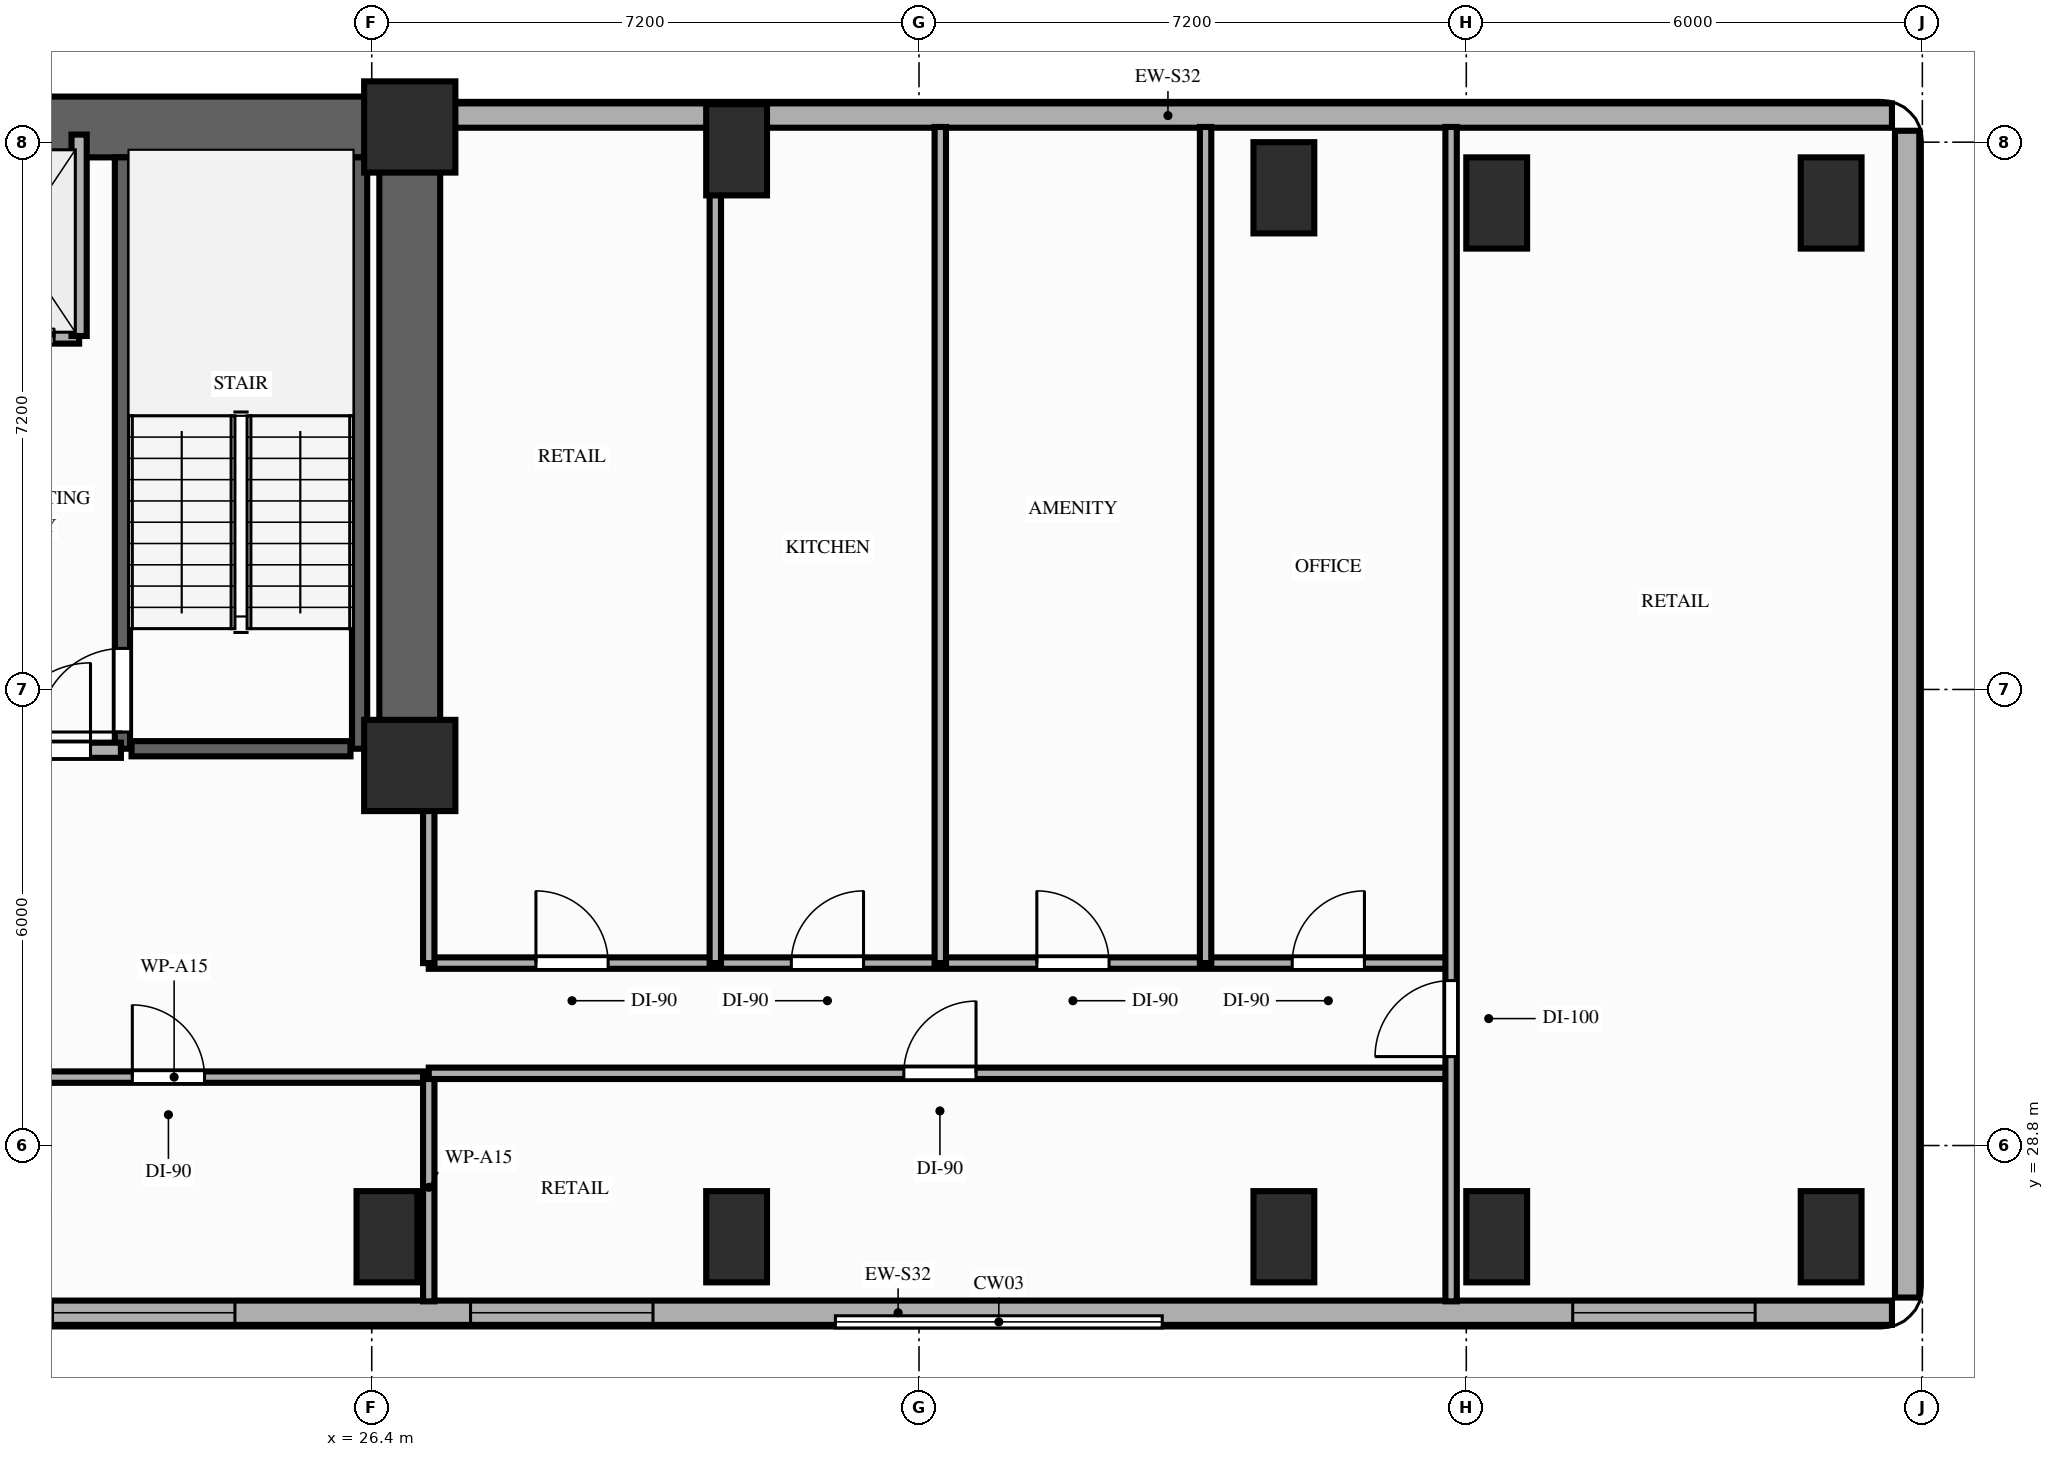
"""IFC4 building model, lengths in metres.
Left out: names, types, materials, properties, quantities, classifications, styles, units other than length and angle.
Written with IfcOpenShell. Run it as: python <this file> out.ifc"""

import sys

from ifc_helpers import new_model, si_unit, direction, frame, frame_2d, origin, origin_2d, place, context, subcontext, project, spatial, rectangle, extrude, element, fill, save


model = new_model("IFC4")
c1 = context("Model", 3, precision=1e-05, world=origin(), true_north=direction((0.0, 1.0)))
c2 = subcontext(c1, "Body", "Model", "MODEL_VIEW")
j1 = project(units=[si_unit("LENGTHUNIT", "METRE"), si_unit("PLANEANGLEUNIT", "RADIAN")], contexts=[c1])
p1 = place(None, origin())
s1 = spatial("IfcSite", under=j1, at=p1, CompositionType="ELEMENT")
p2 = place(p1, origin())
s2 = spatial("IfcBuilding", under=s1, at=p2, CompositionType="ELEMENT")
p3 = place(p2, frame((0.0, 0.0, 75.6)))
s3 = spatial("IfcBuildingStorey", under=s2, at=p3, CompositionType="ELEMENT", Elevation=75.6)
for number, where, z_axis, x_axis in (
    (1, (26.9, 33.8, 0.0), (0.0, 0.0, 1.0), (1.0, 0.0, 0.0)),
    (2, (26.9, 42.2, 0.0), (0.0, 0.0, 1.0), (1.0, 0.0, 0.0)),
):
    element("IfcColumn", number, at=place(p3, frame(where, z_axis=z_axis, x_axis=x_axis)), inside=s3, PredefinedType="COLUMN", context=c2, shape_type="SweptSolid", body=[
        extrude(rectangle(XDim=1.2, YDim=1.2, at=origin_2d()), origin(), (0.0, 0.0, 1.0), 3.8),
    ])
for number, where, z_axis, x_axis in (
    (3, (26.6, 27.6, 0.0), (0.0, 0.0, 1.0), (1.0, 0.0, 0.0)),
    (4, (31.2, 27.6, 0.0), (0.0, 0.0, 1.0), (1.0, 0.0, 0.0)),
    (5, (31.2, 41.9, 0.0), (0.0, 0.0, 1.0), (1.0, 0.0, 0.0)),
    (6, (38.4, 27.6, 0.0), (0.0, 0.0, 1.0), (1.0, 0.0, 0.0)),
    (7, (38.4, 41.4, 0.0), (0.0, 0.0, 1.0), (1.0, 0.0, 0.0)),
    (8, (41.2, 27.6, 0.0), (0.0, 0.0, 1.0), (1.0, 0.0, 0.0)),
    (9, (41.2, 41.2, 0.0), (0.0, 0.0, 1.0), (1.0, 0.0, 0.0)),
    (10, (45.6, 27.6, 0.0), (0.0, 0.0, 1.0), (1.0, 0.0, 0.0)),
    (11, (45.6, 41.2, 0.0), (0.0, 0.0, 1.0), (1.0, 0.0, 0.0)),
):
    element("IfcColumn", number, at=place(p3, frame(where, z_axis=z_axis, x_axis=x_axis)), inside=s3, PredefinedType="COLUMN", context=c2, shape_type="SweptSolid", body=[
        extrude(rectangle(XDim=0.8, YDim=1.2, at=origin_2d()), origin(), (0.0, 0.0, 1.0), 3.8),
    ])
p4 = place(p3, frame((46.4, 42.35, 0.0), z_axis=(0.0, 0.0, 1.0), x_axis=(-1.0, 0.0, 0.0)))
e12 = element("IfcWall", 12, at=p4, inside=s3, PredefinedType="STANDARD", context=c2, shape_type="SweptSolid", body=[
    extrude(rectangle(XDim=19.05, YDim=0.32, at=frame_2d((9.525, 0.0))), origin(), (0.0, 0.0, 1.0), 2.95),
])
p5 = place(p3, frame((20.25, 26.6, 0.0), z_axis=(0.0, 0.0, 1.0), x_axis=(1.0, 0.0, 0.0)))
e13 = element("IfcWall", 13, at=p5, inside=s3, PredefinedType="STANDARD", context=c2, shape_type="SweptSolid", body=[
    extrude(rectangle(XDim=26.15, YDim=0.32, at=frame_2d((13.075, 0.0))), origin(), (0.0, 0.0, 1.0), 3.56),
])
p6 = place(p5, frame((1.95, 0.0, 0.85)))
e14 = element("IfcOpeningElement", 14, at=p6, cuts=e13, PredefinedType="OPENING", context=c2, shape_type="SweptSolid", body=[
    extrude(rectangle(XDim=2.4, YDim=1.8, at=frame_2d((1.2, 0.9))), frame((0.0, 0.17, 0.0), z_axis=(0.0, -1.0, 0.0), x_axis=(1.0, 0.0, 0.0)), (0.0, 0.0, 1.0), 0.34),
])
p7 = place(p5, frame((7.45, 0.0, 0.85)))
e15 = element("IfcOpeningElement", 15, at=p7, cuts=e13, PredefinedType="OPENING", context=c2, shape_type="SweptSolid", body=[
    extrude(rectangle(XDim=2.4, YDim=1.8, at=frame_2d((1.2, 0.9))), frame((0.0, 0.17, 0.0), z_axis=(0.0, -1.0, 0.0), x_axis=(1.0, 0.0, 0.0)), (0.0, 0.0, 1.0), 0.34),
])
p8 = place(p5, frame((21.95, 0.0, 0.85)))
e16 = element("IfcOpeningElement", 16, at=p8, cuts=e13, PredefinedType="OPENING", context=c2, shape_type="SweptSolid", body=[
    extrude(rectangle(XDim=2.4, YDim=1.8, at=frame_2d((1.2, 0.9))), frame((0.0, 0.17, 0.0), z_axis=(0.0, -1.0, 0.0), x_axis=(1.0, 0.0, 0.0)), (0.0, 0.0, 1.0), 0.34),
])
p9 = place(p3, frame((46.6, 26.8, 0.0), z_axis=(0.0, 0.0, 1.0), x_axis=(0.0, 1.0, 0.0)))
e17 = element("IfcWall", 17, at=p9, inside=s3, PredefinedType="STANDARD", context=c2, shape_type="SweptSolid", body=[
    extrude(rectangle(XDim=15.35, YDim=0.32, at=frame_2d((7.675, 0.0))), origin(), (0.0, 0.0, 1.0), 3.56),
])
p10 = place(p3, frame((6.45, 42.2, 0.0), z_axis=(0.0, 0.0, 1.0), x_axis=(1.0, 0.0, 0.0)))
e18 = element("IfcWall", 18, at=p10, inside=s3, PredefinedType="SHEAR", context=c2, shape_type="SweptSolid", body=[
    extrude(rectangle(XDim=20.45, YDim=0.8, at=frame_2d((10.225, 0.0))), origin(), (0.0, 0.0, 1.0), 3.56),
])
p11 = place(p3, frame((26.9, 33.8, 0.0), z_axis=(0.0, 0.0, 1.0), x_axis=(0.0, 1.0, 0.0)))
e19 = element("IfcWall", 19, at=p11, inside=s3, PredefinedType="SHEAR", context=c2, shape_type="SweptSolid", body=[
    extrude(rectangle(XDim=7.95, YDim=0.8, at=frame_2d((3.975, 0.0))), origin(), (0.0, 0.0, 1.0), 3.56),
])
p12 = place(p3, frame((23.12, 34.02, 0.0), z_axis=(0.0, 0.0, 1.0), x_axis=(0.0, 1.0, 0.0)))
e20 = element("IfcWall", 20, at=p12, inside=s3, PredefinedType="SHEAR", context=c2, shape_type="SweptSolid", body=[
    extrude(rectangle(XDim=7.78, YDim=0.2, at=frame_2d((3.89, 0.0))), origin(), (0.0, 0.0, 1.0), 3.56),
])
p13 = place(p12, frame((0.22, 0.0, 0.0)))
e21 = element("IfcOpeningElement", 21, at=p13, cuts=e20, PredefinedType="OPENING", context=c2, shape_type="SweptSolid", body=[
    extrude(rectangle(XDim=1.1, YDim=2.15, at=frame_2d((0.55, 1.075))), frame((0.0, 0.11, 0.0), z_axis=(0.0, -1.0, 0.0), x_axis=(1.0, 0.0, 0.0)), (0.0, 0.0, 1.0), 0.22),
])
p14 = place(p3, frame((26.24, 34.02, 0.0), z_axis=(0.0, 0.0, 1.0), x_axis=(0.0, 1.0, 0.0)))
e22 = element("IfcWall", 22, at=p14, inside=s3, PredefinedType="SHEAR", context=c2, shape_type="SweptSolid", body=[
    extrude(rectangle(XDim=7.78, YDim=0.2, at=frame_2d((3.89, 0.0))), origin(), (0.0, 0.0, 1.0), 3.56),
])
p15 = place(p3, frame((23.24, 34.02, 0.0), z_axis=(0.0, 0.0, 1.0), x_axis=(1.0, 0.0, 0.0)))
e23 = element("IfcWall", 23, at=p15, inside=s3, PredefinedType="SHEAR", context=c2, shape_type="SweptSolid", body=[
    extrude(rectangle(XDim=2.88, YDim=0.2, at=frame_2d((1.44, 0.0))), origin(), (0.0, 0.0, 1.0), 3.56),
])
p16 = place(p3, frame((20.85, 39.45, 0.0), z_axis=(0.0, 0.0, 1.0), x_axis=(1.0, 0.0, 0.0)))
e24 = element("IfcWall", 24, at=p16, inside=s3, PredefinedType="MOVABLE", context=c2, shape_type="SweptSolid", body=[
    extrude(rectangle(XDim=1.7, YDim=0.2, at=frame_2d((0.85, 0.0))), origin(), (0.0, 0.0, 1.0), 3.56),
])
p17 = place(p16, frame((0.32, 0.0, 0.0)))
e25 = element("IfcOpeningElement", 25, at=p17, cuts=e24, PredefinedType="OPENING", context=c2, shape_type="SweptSolid", body=[
    extrude(rectangle(XDim=1.05, YDim=2.15, at=frame_2d((0.525, 1.075))), frame((0.0, 0.11, 0.0), z_axis=(0.0, -1.0, 0.0), x_axis=(1.0, 0.0, 0.0)), (0.0, 0.0, 1.0), 0.22),
])
p18 = place(p3, frame((22.55, 39.45, 0.0), z_axis=(0.0, 0.0, 1.0), x_axis=(0.0, 1.0, 0.0)))
e26 = element("IfcWall", 26, at=p18, inside=s3, PredefinedType="MOVABLE", context=c2, shape_type="SweptSolid", body=[
    extrude(rectangle(XDim=2.65, YDim=0.2, at=frame_2d((1.325, 0.0))), origin(), (0.0, 0.0, 1.0), 2.95),
])
p19 = place(p3, frame((20.5, 34.0, 0.0), z_axis=(0.0, 0.0, 1.0), x_axis=(1.0, 0.0, 0.0)))
e27 = element("IfcWall", 27, at=p19, inside=s3, PredefinedType="PARTITIONING", context=c2, shape_type="SweptSolid", body=[
    extrude(rectangle(XDim=2.6, YDim=0.2, at=frame_2d((1.3, 0.0))), origin(), (0.0, 0.0, 1.0), 2.95),
])
p20 = place(p19, frame((1.05, 0.0, 0.0)))
e28 = element("IfcOpeningElement", 28, at=p20, cuts=e27, PredefinedType="OPENING", context=c2, shape_type="SweptSolid", body=[
    extrude(rectangle(XDim=1.15, YDim=2.15, at=frame_2d((0.575, 1.075))), frame((0.0, 0.11, 0.0), z_axis=(0.0, -1.0, 0.0), x_axis=(1.0, 0.0, 0.0)), (0.0, 0.0, 1.0), 0.22),
])
p21 = place(p3, frame((20.45, 29.7, 0.0), z_axis=(0.0, 0.0, 1.0), x_axis=(1.0, 0.0, 0.0)))
e29 = element("IfcWall", 29, at=p21, inside=s3, PredefinedType="PARTITIONING", context=c2, shape_type="SweptSolid", body=[
    extrude(rectangle(XDim=6.7, YDim=0.15, at=frame_2d((3.35, 0.0))), origin(), (0.0, 0.0, 1.0), 3.56),
])
p22 = place(p21, frame((2.8, 0.0, 0.0)))
e30 = element("IfcOpeningElement", 30, at=p22, cuts=e29, PredefinedType="OPENING", context=c2, shape_type="SweptSolid", body=[
    extrude(rectangle(XDim=0.95, YDim=2.15, at=frame_2d((0.475, 1.075))), frame((0.0, 0.085, 0.0), z_axis=(0.0, -1.0, 0.0), x_axis=(1.0, 0.0, 0.0)), (0.0, 0.0, 1.0), 0.17),
])
p23 = place(p3, frame((27.15, 26.75, 0.0), z_axis=(0.0, 0.0, 1.0), x_axis=(0.0, 1.0, 0.0)))
e31 = element("IfcWall", 31, at=p23, inside=s3, PredefinedType="PARTITIONING", context=c2, shape_type="SweptSolid", body=[
    extrude(rectangle(XDim=3.0, YDim=0.15, at=frame_2d((1.5, 0.0))), origin(), (0.0, 0.0, 1.0), 2.95),
])
p24 = place(p3, frame((27.15, 29.75, 0.0), z_axis=(0.0, 0.0, 1.0), x_axis=(1.0, 0.0, 0.0)))
e32 = element("IfcWall", 32, at=p24, inside=s3, PredefinedType="PARTITIONING", context=c2, shape_type="SweptSolid", body=[
    extrude(rectangle(XDim=13.45, YDim=0.15, at=frame_2d((6.725, 0.0))), origin(), (0.0, 0.0, 1.0), 2.95),
])
p25 = place(p24, frame((6.25, 0.0, 0.0)))
e33 = element("IfcOpeningElement", 33, at=p25, cuts=e32, PredefinedType="OPENING", context=c2, shape_type="SweptSolid", body=[
    extrude(rectangle(XDim=0.95, YDim=2.15, at=frame_2d((0.475, 1.075))), frame((0.0, 0.085, 0.0), z_axis=(0.0, -1.0, 0.0), x_axis=(1.0, 0.0, 0.0)), (0.0, 0.0, 1.0), 0.17),
])
p26 = place(p3, frame((27.15, 31.2, 0.0), z_axis=(0.0, 0.0, 1.0), x_axis=(1.0, 0.0, 0.0)))
e34 = element("IfcWall", 34, at=p26, inside=s3, PredefinedType="PARTITIONING", context=c2, shape_type="SweptSolid", body=[
    extrude(rectangle(XDim=13.45, YDim=0.15, at=frame_2d((6.725, 0.0))), origin(), (0.0, 0.0, 1.0), 2.95),
])
p27 = place(p26, frame((1.41, 0.0, 0.0)))
e35 = element("IfcOpeningElement", 35, at=p27, cuts=e34, PredefinedType="OPENING", context=c2, shape_type="SweptSolid", body=[
    extrude(rectangle(XDim=0.95, YDim=2.15, at=frame_2d((0.475, 1.075))), frame((0.0, 0.085, 0.0), z_axis=(0.0, -1.0, 0.0), x_axis=(1.0, 0.0, 0.0)), (0.0, 0.0, 1.0), 0.17),
])
p28 = place(p26, frame((4.77, 0.0, 0.0)))
e36 = element("IfcOpeningElement", 36, at=p28, cuts=e34, PredefinedType="OPENING", context=c2, shape_type="SweptSolid", body=[
    extrude(rectangle(XDim=0.95, YDim=2.15, at=frame_2d((0.475, 1.075))), frame((0.0, 0.085, 0.0), z_axis=(0.0, -1.0, 0.0), x_axis=(1.0, 0.0, 0.0)), (0.0, 0.0, 1.0), 0.17),
])
p29 = place(p26, frame((8.0, 0.0, 0.0)))
e37 = element("IfcOpeningElement", 37, at=p29, cuts=e34, PredefinedType="OPENING", context=c2, shape_type="SweptSolid", body=[
    extrude(rectangle(XDim=0.95, YDim=2.15, at=frame_2d((0.475, 1.075))), frame((0.0, 0.085, 0.0), z_axis=(0.0, -1.0, 0.0), x_axis=(1.0, 0.0, 0.0)), (0.0, 0.0, 1.0), 0.17),
])
p30 = place(p26, frame((11.36, 0.0, 0.0)))
e38 = element("IfcOpeningElement", 38, at=p30, cuts=e34, PredefinedType="OPENING", context=c2, shape_type="SweptSolid", body=[
    extrude(rectangle(XDim=0.95, YDim=2.15, at=frame_2d((0.475, 1.075))), frame((0.0, 0.085, 0.0), z_axis=(0.0, -1.0, 0.0), x_axis=(1.0, 0.0, 0.0)), (0.0, 0.0, 1.0), 0.17),
])
p31 = place(p3, frame((27.15, 31.2, 0.0), z_axis=(0.0, 0.0, 1.0), x_axis=(0.0, 1.0, 0.0)))
e39 = element("IfcWall", 39, at=p31, inside=s3, PredefinedType="PARTITIONING", context=c2, shape_type="SweptSolid", body=[
    extrude(rectangle(XDim=2.48, YDim=0.15, at=frame_2d((1.24, 0.0))), origin(), (0.0, 0.0, 1.0), 2.95),
])
p32 = place(p3, frame((40.6, 26.75, 0.0), z_axis=(0.0, 0.0, 1.0), x_axis=(0.0, 1.0, 0.0)))
e40 = element("IfcWall", 40, at=p32, inside=s3, PredefinedType="PARTITIONING", context=c2, shape_type="SweptSolid", body=[
    extrude(rectangle(XDim=15.45, YDim=0.15, at=frame_2d((7.725, 0.0))), origin(), (0.0, 0.0, 1.0), 2.95),
])
p33 = place(p32, frame((3.22, 0.0, 0.0)))
e41 = element("IfcOpeningElement", 41, at=p33, cuts=e40, PredefinedType="OPENING", context=c2, shape_type="SweptSolid", body=[
    extrude(rectangle(XDim=1.0, YDim=2.15, at=frame_2d((0.5, 1.075))), frame((0.0, 0.085, 0.0), z_axis=(0.0, -1.0, 0.0), x_axis=(1.0, 0.0, 0.0)), (0.0, 0.0, 1.0), 0.17),
])
for number, where, z_axis, x_axis in (
    (42, (30.92, 31.2, 0.0), (0.0, 0.0, 1.0), (0.0, 1.0, 0.0)),
    (43, (33.88, 31.2, 0.0), (0.0, 0.0, 1.0), (0.0, 1.0, 0.0)),
    (44, (37.37, 31.2, 0.0), (0.0, 0.0, 1.0), (0.0, 1.0, 0.0)),
):
    element("IfcWall", number, at=place(p3, frame(where, z_axis=z_axis, x_axis=x_axis)), inside=s3, PredefinedType="PARTITIONING", context=c2, shape_type="SweptSolid", body=[
        extrude(rectangle(XDim=11.0, YDim=0.15, at=frame_2d((5.5, 0.0))), origin(), (0.0, 0.0, 1.0), 2.95),
    ])
p34 = place(p6, origin())
e45 = element("IfcWindow", 45, at=p34, inside=s3, PartitioningType="SINGLE_PANEL", PredefinedType="WINDOW", context=c2, shape_type="SweptSolid", body=[
    extrude(rectangle(XDim=2.4, YDim=1.8, at=frame_2d((1.2, 0.9))), frame((0.0, 0.03, 0.0), z_axis=(0.0, -1.0, 0.0), x_axis=(1.0, 0.0, 0.0)), (0.0, 0.0, 1.0), 0.06),
])
fill(e14, e45)
p35 = place(p7, origin())
e46 = element("IfcWindow", 46, at=p35, inside=s3, PartitioningType="SINGLE_PANEL", PredefinedType="WINDOW", context=c2, shape_type="SweptSolid", body=[
    extrude(rectangle(XDim=2.4, YDim=1.8, at=frame_2d((1.2, 0.9))), frame((0.0, 0.03, 0.0), z_axis=(0.0, -1.0, 0.0), x_axis=(1.0, 0.0, 0.0)), (0.0, 0.0, 1.0), 0.06),
])
fill(e15, e46)
p36 = place(p8, origin())
e47 = element("IfcWindow", 47, at=p36, inside=s3, PartitioningType="SINGLE_PANEL", PredefinedType="WINDOW", context=c2, shape_type="SweptSolid", body=[
    extrude(rectangle(XDim=2.4, YDim=1.8, at=frame_2d((1.2, 0.9))), frame((0.0, 0.03, 0.0), z_axis=(0.0, -1.0, 0.0), x_axis=(1.0, 0.0, 0.0)), (0.0, 0.0, 1.0), 0.06),
])
fill(e16, e47)
p37 = place(p13, origin())
e48 = element("IfcDoor", 48, at=p37, inside=s3, OperationType="SINGLE_SWING_LEFT", PredefinedType="DOOR", context=c2, shape_type="SweptSolid", body=[
    extrude(rectangle(XDim=1.1, YDim=2.15, at=frame_2d((0.55, 1.075))), frame((0.0, 0.025, 0.0), z_axis=(0.0, -1.0, 0.0), x_axis=(1.0, 0.0, 0.0)), (0.0, 0.0, 1.0), 0.05),
])
fill(e21, e48)
p38 = place(p17, origin())
e49 = element("IfcDoor", 49, at=p38, inside=s3, OperationType="SLIDING_TO_LEFT", PredefinedType="DOOR", context=c2, shape_type="SweptSolid", body=[
    extrude(rectangle(XDim=1.05, YDim=2.15, at=frame_2d((0.525, 1.075))), frame((0.0, 0.025, 0.0), z_axis=(0.0, -1.0, 0.0), x_axis=(1.0, 0.0, 0.0)), (0.0, 0.0, 1.0), 0.05),
])
fill(e25, e49)
p39 = place(p20, origin())
e50 = element("IfcDoor", 50, at=p39, inside=s3, OperationType="SINGLE_SWING_RIGHT", PredefinedType="DOOR", context=c2, shape_type="SweptSolid", body=[
    extrude(rectangle(XDim=1.15, YDim=2.15, at=frame_2d((0.575, 1.075))), frame((0.0, 0.025, 0.0), z_axis=(0.0, -1.0, 0.0), x_axis=(1.0, 0.0, 0.0)), (0.0, 0.0, 1.0), 0.05),
])
fill(e28, e50)
p40 = place(p22, origin())
e51 = element("IfcDoor", 51, at=p40, inside=s3, OperationType="SINGLE_SWING_LEFT", PredefinedType="DOOR", context=c2, shape_type="SweptSolid", body=[
    extrude(rectangle(XDim=0.95, YDim=2.15, at=frame_2d((0.475, 1.075))), frame((0.0, 0.025, 0.0), z_axis=(0.0, -1.0, 0.0), x_axis=(1.0, 0.0, 0.0)), (0.0, 0.0, 1.0), 0.05),
])
fill(e30, e51)
p41 = place(p33, origin())
e52 = element("IfcDoor", 52, at=p41, inside=s3, OperationType="SINGLE_SWING_LEFT", PredefinedType="DOOR", context=c2, shape_type="SweptSolid", body=[
    extrude(rectangle(XDim=1.0, YDim=2.15, at=frame_2d((0.5, 1.075))), frame((0.0, 0.025, 0.0), z_axis=(0.0, -1.0, 0.0), x_axis=(1.0, 0.0, 0.0)), (0.0, 0.0, 1.0), 0.05),
])
fill(e41, e52)
p42 = place(p25, origin())
e53 = element("IfcDoor", 53, at=p42, inside=s3, OperationType="SINGLE_SWING_RIGHT", PredefinedType="DOOR", context=c2, shape_type="SweptSolid", body=[
    extrude(rectangle(XDim=0.95, YDim=2.15, at=frame_2d((0.475, 1.075))), frame((0.0, 0.025, 0.0), z_axis=(0.0, -1.0, 0.0), x_axis=(1.0, 0.0, 0.0)), (0.0, 0.0, 1.0), 0.05),
])
fill(e33, e53)
p43 = place(p27, origin())
e54 = element("IfcDoor", 54, at=p43, inside=s3, OperationType="SINGLE_SWING_LEFT", PredefinedType="DOOR", context=c2, shape_type="SweptSolid", body=[
    extrude(rectangle(XDim=0.95, YDim=2.15, at=frame_2d((0.475, 1.075))), frame((0.0, 0.025, 0.0), z_axis=(0.0, -1.0, 0.0), x_axis=(1.0, 0.0, 0.0)), (0.0, 0.0, 1.0), 0.05),
])
fill(e35, e54)
p44 = place(p28, origin())
e55 = element("IfcDoor", 55, at=p44, inside=s3, OperationType="SINGLE_SWING_RIGHT", PredefinedType="DOOR", context=c2, shape_type="SweptSolid", body=[
    extrude(rectangle(XDim=0.95, YDim=2.15, at=frame_2d((0.475, 1.075))), frame((0.0, 0.025, 0.0), z_axis=(0.0, -1.0, 0.0), x_axis=(1.0, 0.0, 0.0)), (0.0, 0.0, 1.0), 0.05),
])
fill(e36, e55)
p45 = place(p29, origin())
e56 = element("IfcDoor", 56, at=p45, inside=s3, OperationType="SINGLE_SWING_LEFT", PredefinedType="DOOR", context=c2, shape_type="SweptSolid", body=[
    extrude(rectangle(XDim=0.95, YDim=2.15, at=frame_2d((0.475, 1.075))), frame((0.0, 0.025, 0.0), z_axis=(0.0, -1.0, 0.0), x_axis=(1.0, 0.0, 0.0)), (0.0, 0.0, 1.0), 0.05),
])
fill(e37, e56)
p46 = place(p30, origin())
e57 = element("IfcDoor", 57, at=p46, inside=s3, OperationType="SINGLE_SWING_RIGHT", PredefinedType="DOOR", context=c2, shape_type="SweptSolid", body=[
    extrude(rectangle(XDim=0.95, YDim=2.15, at=frame_2d((0.475, 1.075))), frame((0.0, 0.025, 0.0), z_axis=(0.0, -1.0, 0.0), x_axis=(1.0, 0.0, 0.0)), (0.0, 0.0, 1.0), 0.05),
])
fill(e38, e57)
save(model, sys.argv[1])
